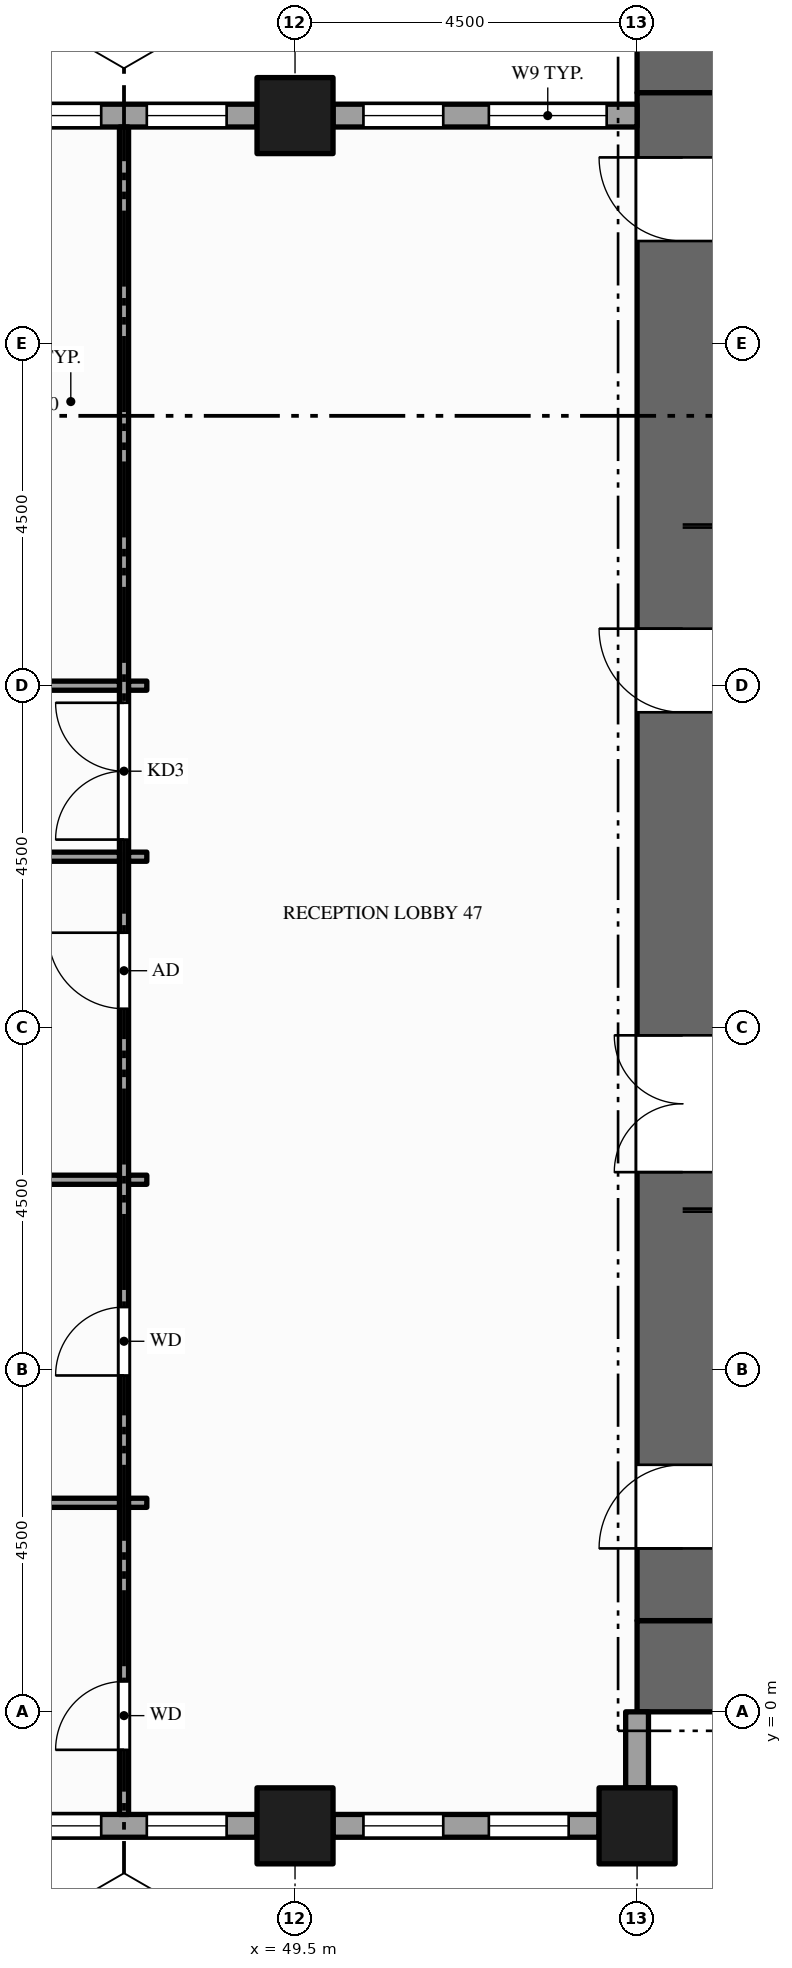
"""IFC4 building model, lengths in metres.
Left out: names, types, materials, properties, quantities, classifications, styles, units other than length and angle.
Written with IfcOpenShell. Run it as: python <this file> out.ifc"""

import sys

from ifc_helpers import new_model, si_unit, direction, frame, frame_2d, origin, origin_2d, place, context, subcontext, project, spatial, rectangle, hollow_rectangle, extrude, element, fill, save


model = new_model("IFC4")
c1 = context("Model", 3, precision=1e-05, world=origin(), true_north=direction((0.0, 1.0)))
c2 = subcontext(c1, "Body", "Model", "MODEL_VIEW")
j1 = project(units=[si_unit("LENGTHUNIT", "METRE"), si_unit("PLANEANGLEUNIT", "RADIAN")], contexts=[c1])
p1 = place(None, origin())
s1 = spatial("IfcSite", under=j1, at=p1, CompositionType="ELEMENT")
p2 = place(p1, origin())
s2 = spatial("IfcBuilding", under=s1, at=p2, CompositionType="ELEMENT")
p3 = place(p2, frame((0.0, 0.0, 83.0)))
s3 = spatial("IfcBuildingStorey", under=s2, at=p3, CompositionType="ELEMENT", Elevation=83.0)
for number, where, z_axis, x_axis in (
    (1, (67.5, 0.6, -0.15), (0.0, 0.0, 1.0), (-1.0, 0.0, 0.0)),
    (2, (54.0, 21.9, -0.15), (0.0, 0.0, 1.0), (1.0, 0.0, 0.0)),
):
    element("IfcWall", number, at=place(p3, frame(where, z_axis=z_axis, x_axis=x_axis)), inside=s3, PredefinedType="SHEAR", context=c2, shape_type="SweptSolid", body=[
        extrude(rectangle(XDim=13.5, YDim=1.2, at=frame_2d((6.75, 0.0))), origin(), (0.0, 0.0, 1.0), 4.0),
    ])
p4 = place(p3, frame((54.6, 1.2, -0.15), z_axis=(0.0, 0.0, 1.0), x_axis=(0.0, 1.0, 0.0)))
e3 = element("IfcWall", 3, at=p4, inside=s3, PredefinedType="SHEAR", context=c2, shape_type="SweptSolid", body=[
    extrude(rectangle(XDim=20.1, YDim=1.2, at=frame_2d((10.05, 0.0))), origin(), (0.0, 0.0, 1.0), 4.0),
])
p5 = place(p4, frame((5.9, 0.0, 0.15)))
e4 = element("IfcOpeningElement", 4, at=p5, cuts=e3, PredefinedType="OPENING", context=c2, shape_type="SweptSolid", body=[
    extrude(rectangle(XDim=1.8, YDim=2.1, at=frame_2d((0.9, 1.05))), frame((0.0, 0.61, 0.0), z_axis=(0.0, -1.0, 0.0), x_axis=(1.0, 0.0, 0.0)), (0.0, 0.0, 1.0), 1.22),
])
p6 = place(p4, frame((11.95, 0.0, 0.15)))
e5 = element("IfcOpeningElement", 5, at=p6, cuts=e3, PredefinedType="OPENING", context=c2, shape_type="SweptSolid", body=[
    extrude(rectangle(XDim=1.1, YDim=2.1, at=frame_2d((0.55, 1.05))), frame((0.0, 0.61, 0.0), z_axis=(0.0, -1.0, 0.0), x_axis=(1.0, 0.0, 0.0)), (0.0, 0.0, 1.0), 1.22),
])
p7 = place(p4, frame((0.95, 0.0, 0.15)))
e6 = element("IfcOpeningElement", 6, at=p7, cuts=e3, PredefinedType="OPENING", context=c2, shape_type="SweptSolid", body=[
    extrude(rectangle(XDim=1.1, YDim=2.1, at=frame_2d((0.55, 1.05))), frame((0.0, 0.61, 0.0), z_axis=(0.0, -1.0, 0.0), x_axis=(1.0, 0.0, 0.0)), (0.0, 0.0, 1.0), 1.22),
])
p8 = place(p4, frame((18.15, 0.0, 0.15)))
e7 = element("IfcOpeningElement", 7, at=p8, cuts=e3, PredefinedType="OPENING", context=c2, shape_type="SweptSolid", body=[
    extrude(rectangle(XDim=1.1, YDim=2.1, at=frame_2d((0.55, 1.05))), frame((0.0, 0.61, 0.0), z_axis=(0.0, -1.0, 0.0), x_axis=(1.0, 0.0, 0.0)), (0.0, 0.0, 1.0), 1.22),
])
for number, where, z_axis, x_axis in (
    (8, (49.5, -1.5, -0.15), (0.0, 0.0, 1.0), (1.0, 0.0, 0.0)),
    (9, (49.5, 21.0, -0.15), (0.0, 0.0, 1.0), (1.0, 0.0, 0.0)),
    (10, (54.0, -1.5, -0.15), (0.0, 0.0, 1.0), (1.0, 0.0, 0.0)),
):
    element("IfcColumn", number, at=place(p3, frame(where, z_axis=z_axis, x_axis=x_axis)), inside=s3, PredefinedType="COLUMN", context=c2, shape_type="SweptSolid", body=[
        extrude(hollow_rectangle(XDim=1.0, YDim=1.0, WallThickness=0.05, at=origin_2d()), origin(), (0.0, 0.0, 1.0), 4.0),
    ])
p9 = place(p3, frame((45.5, -1.5, 0.0), z_axis=(0.0, 0.0, 1.0), x_axis=(1.0, 0.0, 0.0)))
e11 = element("IfcWall", 11, at=p9, inside=s3, PredefinedType="STANDARD", context=c2, shape_type="SweptSolid", body=[
    extrude(rectangle(XDim=3.5, YDim=0.3, at=frame_2d((1.75, 0.0))), origin(), (0.0, 0.0, 1.0), 3.154),
])
p10 = place(p9, frame((0.4, 0.0, 0.9)))
e12 = element("IfcOpeningElement", 12, at=p10, cuts=e11, PredefinedType="OPENING", context=c2, shape_type="SweptSolid", body=[
    extrude(rectangle(XDim=1.05, YDim=2.0, at=frame_2d((0.525, 1.0))), frame((0.0, 0.16, 0.0), z_axis=(0.0, -1.0, 0.0), x_axis=(1.0, 0.0, 0.0)), (0.0, 0.0, 1.0), 0.32),
])
p11 = place(p9, frame((2.05, 0.0, 0.9)))
e13 = element("IfcOpeningElement", 13, at=p11, cuts=e11, PredefinedType="OPENING", context=c2, shape_type="SweptSolid", body=[
    extrude(rectangle(XDim=1.05, YDim=2.0, at=frame_2d((0.525, 1.0))), frame((0.0, 0.16, 0.0), z_axis=(0.0, -1.0, 0.0), x_axis=(1.0, 0.0, 0.0)), (0.0, 0.0, 1.0), 0.32),
])
p12 = place(p3, frame((50.0, -1.5, 0.0), z_axis=(0.0, 0.0, 1.0), x_axis=(1.0, 0.0, 0.0)))
e14 = element("IfcWall", 14, at=p12, inside=s3, PredefinedType="STANDARD", context=c2, shape_type="SweptSolid", body=[
    extrude(rectangle(XDim=3.5, YDim=0.3, at=frame_2d((1.75, 0.0))), origin(), (0.0, 0.0, 1.0), 3.154),
])
p13 = place(p12, frame((0.4, 0.0, 0.9)))
e15 = element("IfcOpeningElement", 15, at=p13, cuts=e14, PredefinedType="OPENING", context=c2, shape_type="SweptSolid", body=[
    extrude(rectangle(XDim=1.05, YDim=2.0, at=frame_2d((0.525, 1.0))), frame((0.0, 0.16, 0.0), z_axis=(0.0, -1.0, 0.0), x_axis=(1.0, 0.0, 0.0)), (0.0, 0.0, 1.0), 0.32),
])
p14 = place(p12, frame((2.05, 0.0, 0.9)))
e16 = element("IfcOpeningElement", 16, at=p14, cuts=e14, PredefinedType="OPENING", context=c2, shape_type="SweptSolid", body=[
    extrude(rectangle(XDim=1.05, YDim=2.0, at=frame_2d((0.525, 1.0))), frame((0.0, 0.16, 0.0), z_axis=(0.0, -1.0, 0.0), x_axis=(1.0, 0.0, 0.0)), (0.0, 0.0, 1.0), 0.32),
])
p15 = place(p3, frame((54.0, -1.0, 0.0), z_axis=(0.0, 0.0, 1.0), x_axis=(0.0, 1.0, 0.0)))
e17 = element("IfcWall", 17, at=p15, inside=s3, PredefinedType="STANDARD", context=c2, shape_type="SweptSolid", body=[
    extrude(rectangle(XDim=1.0, YDim=0.3, at=frame_2d((0.5, 0.0))), origin(), (0.0, 0.0, 1.0), 3.154),
])
p16 = place(p3, frame((54.0, 21.0, 0.0), z_axis=(0.0, 0.0, 1.0), x_axis=(-1.0, 0.0, 0.0)))
e18 = element("IfcWall", 18, at=p16, inside=s3, PredefinedType="STANDARD", context=c2, shape_type="SweptSolid", body=[
    extrude(rectangle(XDim=4.0, YDim=0.3, at=frame_2d((2.0, 0.0))), origin(), (0.0, 0.0, 1.0), 3.154),
])
p17 = place(p16, frame((0.4, 0.0, 0.9)))
e19 = element("IfcOpeningElement", 19, at=p17, cuts=e18, PredefinedType="OPENING", context=c2, shape_type="SweptSolid", body=[
    extrude(rectangle(XDim=1.55, YDim=2.0, at=frame_2d((0.775, 1.0))), frame((0.0, 0.16, 0.0), z_axis=(0.0, -1.0, 0.0), x_axis=(1.0, 0.0, 0.0)), (0.0, 0.0, 1.0), 0.32),
])
p18 = place(p16, frame((2.55, 0.0, 0.9)))
e20 = element("IfcOpeningElement", 20, at=p18, cuts=e18, PredefinedType="OPENING", context=c2, shape_type="SweptSolid", body=[
    extrude(rectangle(XDim=1.05, YDim=2.0, at=frame_2d((0.525, 1.0))), frame((0.0, 0.16, 0.0), z_axis=(0.0, -1.0, 0.0), x_axis=(1.0, 0.0, 0.0)), (0.0, 0.0, 1.0), 0.32),
])
p19 = place(p3, frame((49.0, 21.0, 0.0), z_axis=(0.0, 0.0, 1.0), x_axis=(-1.0, 0.0, 0.0)))
e21 = element("IfcWall", 21, at=p19, inside=s3, PredefinedType="STANDARD", context=c2, shape_type="SweptSolid", body=[
    extrude(rectangle(XDim=3.5, YDim=0.3, at=frame_2d((1.75, 0.0))), origin(), (0.0, 0.0, 1.0), 3.154),
])
p20 = place(p19, frame((0.4, 0.0, 0.9)))
e22 = element("IfcOpeningElement", 22, at=p20, cuts=e21, PredefinedType="OPENING", context=c2, shape_type="SweptSolid", body=[
    extrude(rectangle(XDim=1.05, YDim=2.0, at=frame_2d((0.525, 1.0))), frame((0.0, 0.16, 0.0), z_axis=(0.0, -1.0, 0.0), x_axis=(1.0, 0.0, 0.0)), (0.0, 0.0, 1.0), 0.32),
])
p21 = place(p19, frame((2.05, 0.0, 0.9)))
e23 = element("IfcOpeningElement", 23, at=p21, cuts=e21, PredefinedType="OPENING", context=c2, shape_type="SweptSolid", body=[
    extrude(rectangle(XDim=1.05, YDim=2.0, at=frame_2d((0.525, 1.0))), frame((0.0, 0.16, 0.0), z_axis=(0.0, -1.0, 0.0), x_axis=(1.0, 0.0, 0.0)), (0.0, 0.0, 1.0), 0.32),
])
p22 = place(p3, frame((47.25, -1.35, 0.0), z_axis=(0.0, 0.0, 1.0), x_axis=(0.0, 1.0, 0.0)))
e24 = element("IfcWall", 24, at=p22, inside=s3, PredefinedType="PARTITIONING", context=c2, shape_type="SweptSolid", body=[
    extrude(rectangle(XDim=22.2, YDim=0.12, at=frame_2d((11.1, 0.0))), origin(), (0.0, 0.0, 1.0), 2.938),
])
p23 = place(p22, frame((12.825, 0.0, 0.0)))
e25 = element("IfcOpeningElement", 25, at=p23, cuts=e24, PredefinedType="OPENING", context=c2, shape_type="SweptSolid", body=[
    extrude(rectangle(XDim=1.8, YDim=2.1, at=frame_2d((0.9, 1.05))), frame((0.0, 0.07, 0.0), z_axis=(0.0, -1.0, 0.0), x_axis=(1.0, 0.0, 0.0)), (0.0, 0.0, 1.0), 0.14),
])
p24 = place(p22, frame((0.85, 0.0, 0.0)))
e26 = element("IfcOpeningElement", 26, at=p24, cuts=e24, PredefinedType="OPENING", context=c2, shape_type="SweptSolid", body=[
    extrude(rectangle(XDim=0.9, YDim=2.1, at=frame_2d((0.45, 1.05))), frame((0.0, 0.07, 0.0), z_axis=(0.0, -1.0, 0.0), x_axis=(1.0, 0.0, 0.0)), (0.0, 0.0, 1.0), 0.14),
])
p25 = place(p22, frame((5.775, 0.0, 0.0)))
e27 = element("IfcOpeningElement", 27, at=p25, cuts=e24, PredefinedType="OPENING", context=c2, shape_type="SweptSolid", body=[
    extrude(rectangle(XDim=0.9, YDim=2.1, at=frame_2d((0.45, 1.05))), frame((0.0, 0.07, 0.0), z_axis=(0.0, -1.0, 0.0), x_axis=(1.0, 0.0, 0.0)), (0.0, 0.0, 1.0), 0.14),
])
p26 = place(p22, frame((10.6, 0.0, 0.0)))
e28 = element("IfcOpeningElement", 28, at=p26, cuts=e24, PredefinedType="OPENING", context=c2, shape_type="SweptSolid", body=[
    extrude(rectangle(XDim=1.0, YDim=2.1, at=frame_2d((0.5, 1.05))), frame((0.0, 0.07, 0.0), z_axis=(0.0, -1.0, 0.0), x_axis=(1.0, 0.0, 0.0)), (0.0, 0.0, 1.0), 0.14),
])
p27 = place(p3, frame((42.81, 2.75, 0.0), z_axis=(0.0, 0.0, 1.0), x_axis=(1.0, 0.0, 0.0)))
e29 = element("IfcWall", 29, at=p27, inside=s3, PredefinedType="PARTITIONING", context=c2, shape_type="SweptSolid", body=[
    extrude(rectangle(XDim=4.38, YDim=0.12, at=frame_2d((2.19, 0.0))), origin(), (0.0, 0.0, 1.0), 2.938),
])
p28 = place(p3, frame((47.31, 2.75, 0.0), z_axis=(0.0, 0.0, 1.0), x_axis=(1.0, 0.0, 0.0)))
e30 = element("IfcWall", 30, at=p28, inside=s3, PredefinedType="PARTITIONING", context=c2, shape_type="SweptSolid", body=[
    extrude(rectangle(XDim=0.24, YDim=0.12, at=frame_2d((0.12, 0.0))), origin(), (0.0, 0.0, 1.0), 2.938),
])
p29 = place(p3, frame((42.81, 7.0, 0.0), z_axis=(0.0, 0.0, 1.0), x_axis=(1.0, 0.0, 0.0)))
e31 = element("IfcWall", 31, at=p29, inside=s3, PredefinedType="PARTITIONING", context=c2, shape_type="SweptSolid", body=[
    extrude(rectangle(XDim=4.38, YDim=0.12, at=frame_2d((2.19, 0.0))), origin(), (0.0, 0.0, 1.0), 2.938),
])
p30 = place(p3, frame((47.31, 7.0, 0.0), z_axis=(0.0, 0.0, 1.0), x_axis=(1.0, 0.0, 0.0)))
e32 = element("IfcWall", 32, at=p30, inside=s3, PredefinedType="PARTITIONING", context=c2, shape_type="SweptSolid", body=[
    extrude(rectangle(XDim=0.24, YDim=0.12, at=frame_2d((0.12, 0.0))), origin(), (0.0, 0.0, 1.0), 2.938),
])
p31 = place(p3, frame((42.81, 11.25, 0.0), z_axis=(0.0, 0.0, 1.0), x_axis=(1.0, 0.0, 0.0)))
e33 = element("IfcWall", 33, at=p31, inside=s3, PredefinedType="PARTITIONING", context=c2, shape_type="SweptSolid", body=[
    extrude(rectangle(XDim=4.38, YDim=0.12, at=frame_2d((2.19, 0.0))), origin(), (0.0, 0.0, 1.0), 2.938),
])
p32 = place(p3, frame((47.31, 11.25, 0.0), z_axis=(0.0, 0.0, 1.0), x_axis=(1.0, 0.0, 0.0)))
e34 = element("IfcWall", 34, at=p32, inside=s3, PredefinedType="PARTITIONING", context=c2, shape_type="SweptSolid", body=[
    extrude(rectangle(XDim=0.24, YDim=0.12, at=frame_2d((0.12, 0.0))), origin(), (0.0, 0.0, 1.0), 2.938),
])
p33 = place(p3, frame((42.81, 13.5, 0.0), z_axis=(0.0, 0.0, 1.0), x_axis=(1.0, 0.0, 0.0)))
e35 = element("IfcWall", 35, at=p33, inside=s3, PredefinedType="PARTITIONING", context=c2, shape_type="SweptSolid", body=[
    extrude(rectangle(XDim=4.38, YDim=0.12, at=frame_2d((2.19, 0.0))), origin(), (0.0, 0.0, 1.0), 2.938),
])
p34 = place(p33, frame((1.59, 0.0, 0.0)))
e36 = element("IfcOpeningElement", 36, at=p34, cuts=e35, PredefinedType="OPENING", context=c2, shape_type="SweptSolid", body=[
    extrude(rectangle(XDim=1.2, YDim=2.1, at=frame_2d((0.6, 1.05))), frame((0.0, 0.07, 0.0), z_axis=(0.0, -1.0, 0.0), x_axis=(1.0, 0.0, 0.0)), (0.0, 0.0, 1.0), 0.14),
])
p35 = place(p3, frame((47.31, 13.5, 0.0), z_axis=(0.0, 0.0, 1.0), x_axis=(1.0, 0.0, 0.0)))
e37 = element("IfcWall", 37, at=p35, inside=s3, PredefinedType="PARTITIONING", context=c2, shape_type="SweptSolid", body=[
    extrude(rectangle(XDim=0.24, YDim=0.12, at=frame_2d((0.12, 0.0))), origin(), (0.0, 0.0, 1.0), 2.938),
])
p36 = place(p10, origin())
e38 = element("IfcWindow", 38, at=p36, inside=s3, PartitioningType="SINGLE_PANEL", PredefinedType="WINDOW", context=c2, shape_type="SweptSolid", body=[
    extrude(rectangle(XDim=1.05, YDim=2.0, at=frame_2d((0.525, 1.0))), frame((0.0, 0.03, 0.0), z_axis=(0.0, -1.0, 0.0), x_axis=(1.0, 0.0, 0.0)), (0.0, 0.0, 1.0), 0.06),
])
fill(e12, e38)
p37 = place(p11, origin())
e39 = element("IfcWindow", 39, at=p37, inside=s3, PartitioningType="SINGLE_PANEL", PredefinedType="WINDOW", context=c2, shape_type="SweptSolid", body=[
    extrude(rectangle(XDim=1.05, YDim=2.0, at=frame_2d((0.525, 1.0))), frame((0.0, 0.03, 0.0), z_axis=(0.0, -1.0, 0.0), x_axis=(1.0, 0.0, 0.0)), (0.0, 0.0, 1.0), 0.06),
])
fill(e13, e39)
p38 = place(p13, origin())
e40 = element("IfcWindow", 40, at=p38, inside=s3, PartitioningType="SINGLE_PANEL", PredefinedType="WINDOW", context=c2, shape_type="SweptSolid", body=[
    extrude(rectangle(XDim=1.05, YDim=2.0, at=frame_2d((0.525, 1.0))), frame((0.0, 0.03, 0.0), z_axis=(0.0, -1.0, 0.0), x_axis=(1.0, 0.0, 0.0)), (0.0, 0.0, 1.0), 0.06),
])
fill(e15, e40)
p39 = place(p14, origin())
e41 = element("IfcWindow", 41, at=p39, inside=s3, PartitioningType="SINGLE_PANEL", PredefinedType="WINDOW", context=c2, shape_type="SweptSolid", body=[
    extrude(rectangle(XDim=1.05, YDim=2.0, at=frame_2d((0.525, 1.0))), frame((0.0, 0.03, 0.0), z_axis=(0.0, -1.0, 0.0), x_axis=(1.0, 0.0, 0.0)), (0.0, 0.0, 1.0), 0.06),
])
fill(e16, e41)
p40 = place(p17, origin())
e42 = element("IfcWindow", 42, at=p40, inside=s3, PartitioningType="SINGLE_PANEL", PredefinedType="WINDOW", context=c2, shape_type="SweptSolid", body=[
    extrude(rectangle(XDim=1.55, YDim=2.0, at=frame_2d((0.775, 1.0))), frame((0.0, 0.03, 0.0), z_axis=(0.0, -1.0, 0.0), x_axis=(1.0, 0.0, 0.0)), (0.0, 0.0, 1.0), 0.06),
])
fill(e19, e42)
p41 = place(p18, origin())
e43 = element("IfcWindow", 43, at=p41, inside=s3, PartitioningType="SINGLE_PANEL", PredefinedType="WINDOW", context=c2, shape_type="SweptSolid", body=[
    extrude(rectangle(XDim=1.05, YDim=2.0, at=frame_2d((0.525, 1.0))), frame((0.0, 0.03, 0.0), z_axis=(0.0, -1.0, 0.0), x_axis=(1.0, 0.0, 0.0)), (0.0, 0.0, 1.0), 0.06),
])
fill(e20, e43)
p42 = place(p20, origin())
e44 = element("IfcWindow", 44, at=p42, inside=s3, PartitioningType="SINGLE_PANEL", PredefinedType="WINDOW", context=c2, shape_type="SweptSolid", body=[
    extrude(rectangle(XDim=1.05, YDim=2.0, at=frame_2d((0.525, 1.0))), frame((0.0, 0.03, 0.0), z_axis=(0.0, -1.0, 0.0), x_axis=(1.0, 0.0, 0.0)), (0.0, 0.0, 1.0), 0.06),
])
fill(e22, e44)
p43 = place(p21, origin())
e45 = element("IfcWindow", 45, at=p43, inside=s3, PartitioningType="SINGLE_PANEL", PredefinedType="WINDOW", context=c2, shape_type="SweptSolid", body=[
    extrude(rectangle(XDim=1.05, YDim=2.0, at=frame_2d((0.525, 1.0))), frame((0.0, 0.03, 0.0), z_axis=(0.0, -1.0, 0.0), x_axis=(1.0, 0.0, 0.0)), (0.0, 0.0, 1.0), 0.06),
])
fill(e23, e45)
p44 = place(p5, origin())
e46 = element("IfcDoor", 46, at=p44, inside=s3, OperationType="DOUBLE_DOOR_SINGLE_SWING", PredefinedType="DOOR", context=c2, shape_type="SweptSolid", body=[
    extrude(rectangle(XDim=1.8, YDim=2.1, at=frame_2d((0.9, 1.05))), frame((0.0, 0.025, 0.0), z_axis=(0.0, -1.0, 0.0), x_axis=(1.0, 0.0, 0.0)), (0.0, 0.0, 1.0), 0.05),
])
fill(e4, e46)
p45 = place(p6, origin())
e47 = element("IfcDoor", 47, at=p45, inside=s3, OperationType="SINGLE_SWING_RIGHT", PredefinedType="DOOR", context=c2, shape_type="SweptSolid", body=[
    extrude(rectangle(XDim=1.1, YDim=2.1, at=frame_2d((0.55, 1.05))), frame((0.0, 0.025, 0.0), z_axis=(0.0, -1.0, 0.0), x_axis=(1.0, 0.0, 0.0)), (0.0, 0.0, 1.0), 0.05),
])
fill(e5, e47)
p46 = place(p7, origin())
e48 = element("IfcDoor", 48, at=p46, inside=s3, OperationType="SINGLE_SWING_LEFT", PredefinedType="DOOR", context=c2, shape_type="SweptSolid", body=[
    extrude(rectangle(XDim=1.1, YDim=2.1, at=frame_2d((0.55, 1.05))), frame((0.0, 0.025, 0.0), z_axis=(0.0, -1.0, 0.0), x_axis=(1.0, 0.0, 0.0)), (0.0, 0.0, 1.0), 0.05),
])
fill(e6, e48)
p47 = place(p8, origin())
e49 = element("IfcDoor", 49, at=p47, inside=s3, OperationType="SINGLE_SWING_RIGHT", PredefinedType="DOOR", context=c2, shape_type="SweptSolid", body=[
    extrude(rectangle(XDim=1.1, YDim=2.1, at=frame_2d((0.55, 1.05))), frame((0.0, 0.025, 0.0), z_axis=(0.0, -1.0, 0.0), x_axis=(1.0, 0.0, 0.0)), (0.0, 0.0, 1.0), 0.05),
])
fill(e7, e49)
p48 = place(p23, origin())
e50 = element("IfcDoor", 50, at=p48, inside=s3, OperationType="DOUBLE_DOOR_SINGLE_SWING", PredefinedType="DOOR", context=c2, shape_type="SweptSolid", body=[
    extrude(rectangle(XDim=1.8, YDim=2.1, at=frame_2d((0.9, 1.05))), frame((0.0, 0.025, 0.0), z_axis=(0.0, -1.0, 0.0), x_axis=(1.0, 0.0, 0.0)), (0.0, 0.0, 1.0), 0.05),
])
fill(e25, e50)
p49 = place(p24, origin())
e51 = element("IfcDoor", 51, at=p49, inside=s3, OperationType="SINGLE_SWING_LEFT", PredefinedType="DOOR", context=c2, shape_type="SweptSolid", body=[
    extrude(rectangle(XDim=0.9, YDim=2.1, at=frame_2d((0.45, 1.05))), frame((0.0, 0.025, 0.0), z_axis=(0.0, -1.0, 0.0), x_axis=(1.0, 0.0, 0.0)), (0.0, 0.0, 1.0), 0.05),
])
fill(e26, e51)
p50 = place(p25, origin())
e52 = element("IfcDoor", 52, at=p50, inside=s3, OperationType="SINGLE_SWING_LEFT", PredefinedType="DOOR", context=c2, shape_type="SweptSolid", body=[
    extrude(rectangle(XDim=0.9, YDim=2.1, at=frame_2d((0.45, 1.05))), frame((0.0, 0.025, 0.0), z_axis=(0.0, -1.0, 0.0), x_axis=(1.0, 0.0, 0.0)), (0.0, 0.0, 1.0), 0.05),
])
fill(e27, e52)
p51 = place(p26, origin())
e53 = element("IfcDoor", 53, at=p51, inside=s3, OperationType="SINGLE_SWING_RIGHT", PredefinedType="DOOR", context=c2, shape_type="SweptSolid", body=[
    extrude(rectangle(XDim=1.0, YDim=2.1, at=frame_2d((0.5, 1.05))), frame((0.0, 0.025, 0.0), z_axis=(0.0, -1.0, 0.0), x_axis=(1.0, 0.0, 0.0)), (0.0, 0.0, 1.0), 0.05),
])
fill(e28, e53)
save(model, sys.argv[1])
